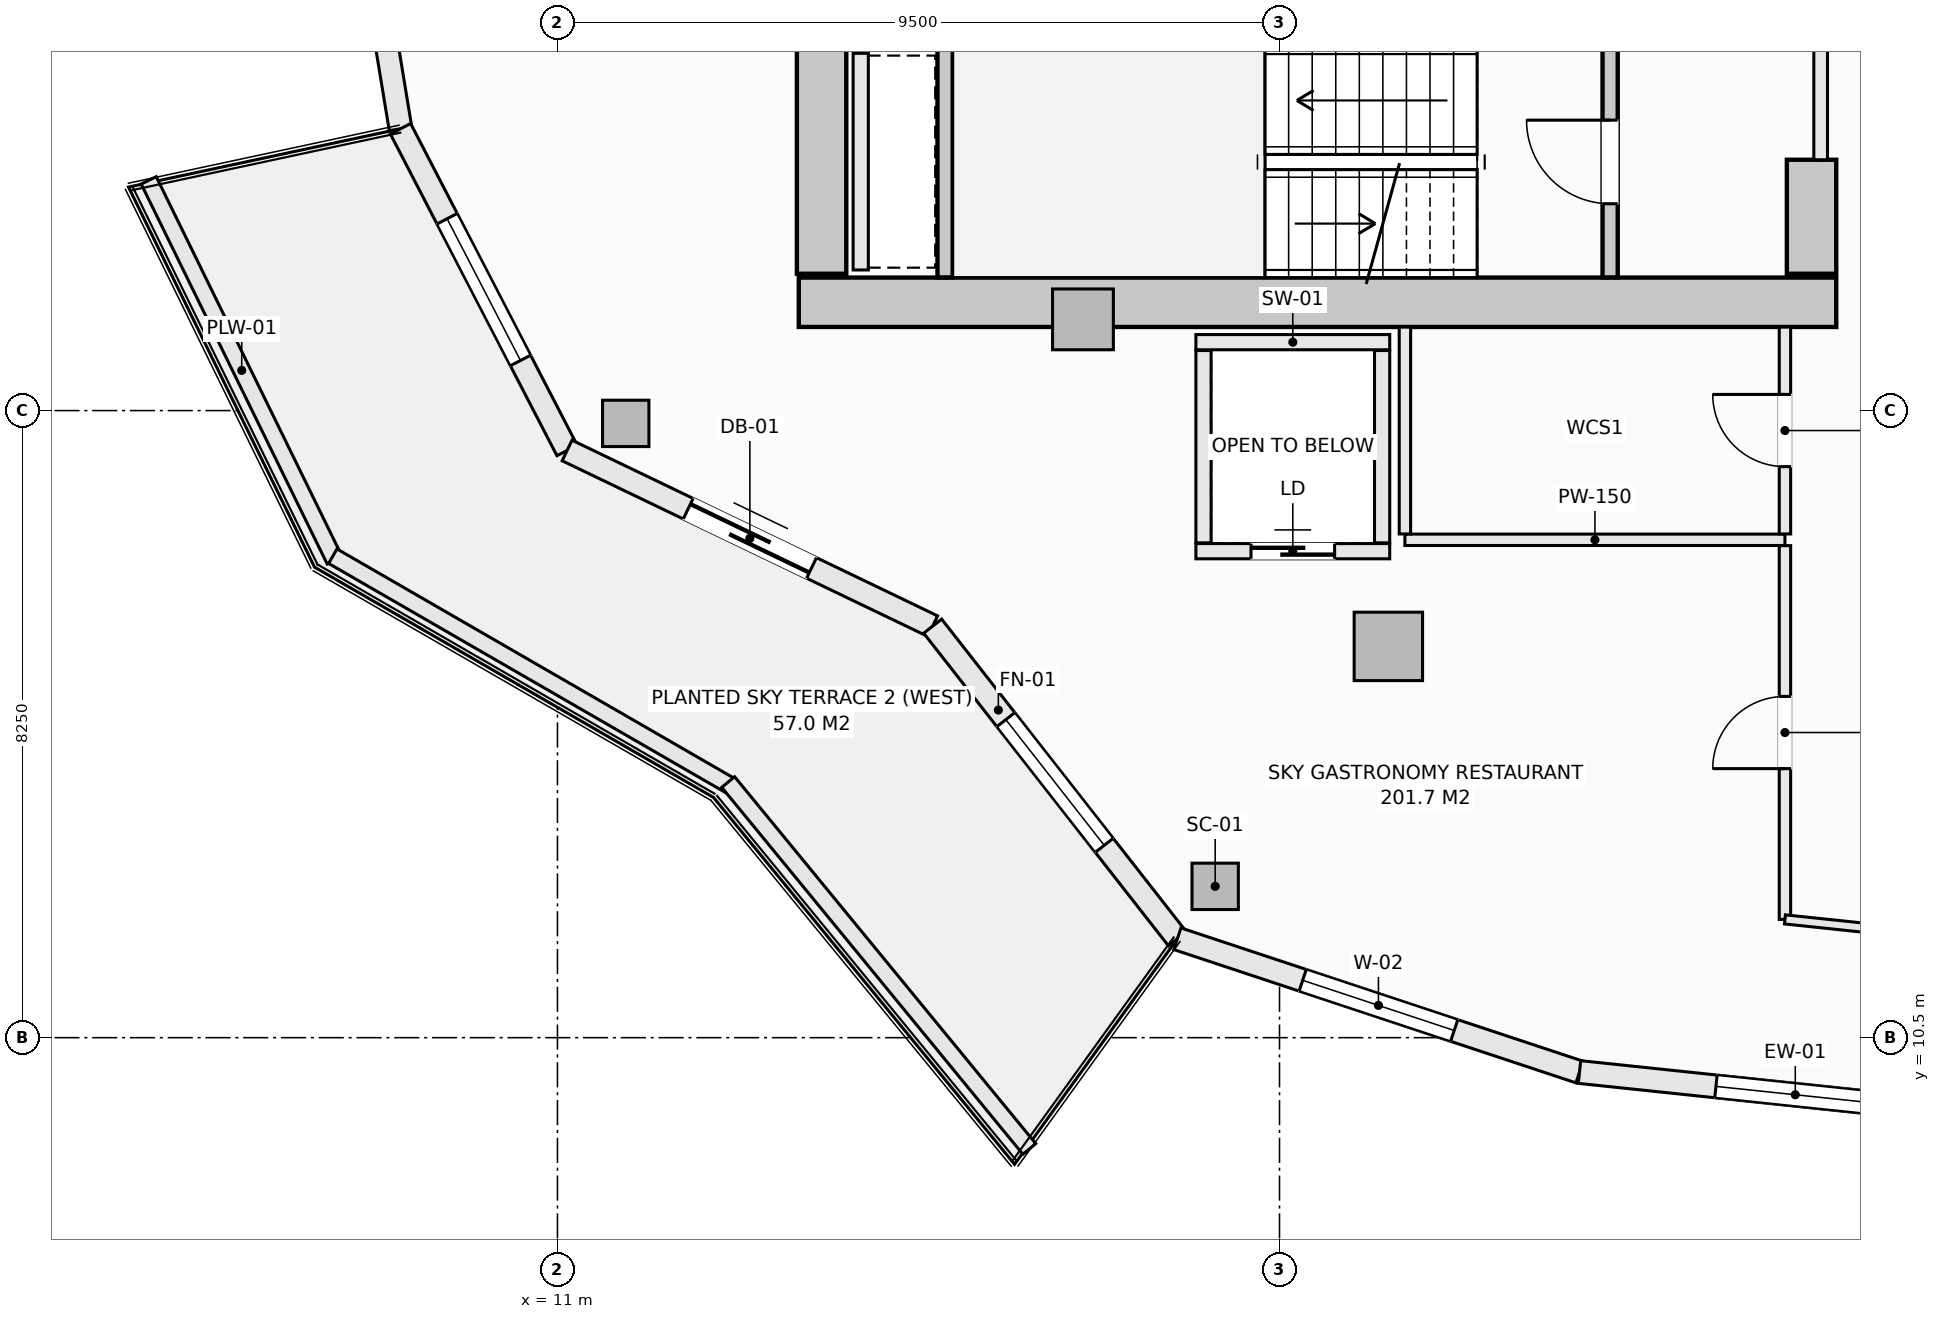
"""IFC4 building model, lengths in metres.
Left out: names, types, materials, properties, quantities, classifications, styles, units other than length and angle.
Written with IfcOpenShell. Run it as: python <this file> out.ifc"""

import sys

from ifc_helpers import new_model, si_unit, direction, frame, frame_2d, origin, origin_2d, place, context, subcontext, project, spatial, rectangle, hollow_rectangle, extrude, element, fill, save


model = new_model("IFC4")
c1 = context("Model", 3, precision=1e-05, world=origin(), true_north=direction((0.0, 1.0)))
c2 = subcontext(c1, "Body", "Model", "MODEL_VIEW")
j1 = project(units=[si_unit("LENGTHUNIT", "METRE"), si_unit("PLANEANGLEUNIT", "RADIAN")], contexts=[c1])
p1 = place(None, origin())
s1 = spatial("IfcSite", under=j1, at=p1, CompositionType="ELEMENT")
p2 = place(p1, origin())
s2 = spatial("IfcBuilding", under=s1, at=p2, CompositionType="ELEMENT")
p3 = place(p2, frame((0.0, 0.0, 183.5)))
s3 = spatial("IfcBuildingStorey", under=s2, at=p3, CompositionType="ELEMENT", Elevation=183.5)
p4 = place(p3, frame((14.175, 20.175, -0.27), z_axis=(0.0, 0.0, 1.0), x_axis=(1.0, 0.0, 0.0)))
e1 = element("IfcWall", 1, at=p4, inside=s3, PredefinedType="SHEAR", context=c2, shape_type="SweptSolid", body=[
    extrude(rectangle(XDim=13.65, YDim=0.65, at=frame_2d((6.825, 0.0))), origin(), (0.0, 0.0, 1.0), 3.35),
])
p5 = place(p3, frame((14.475, 20.55, -0.27), z_axis=(0.0, 0.0, 1.0), x_axis=(0.0, 1.0, 0.0)))
e2 = element("IfcWall", 2, at=p5, inside=s3, PredefinedType="SHEAR", context=c2, shape_type="SweptSolid", body=[
    extrude(rectangle(XDim=12.9, YDim=0.65, at=frame_2d((6.45, 0.0))), origin(), (0.0, 0.0, 1.0), 3.35),
])
p6 = place(p3, frame((27.5, 20.55, -0.27), z_axis=(0.0, 0.0, 1.0), x_axis=(0.0, 1.0, 0.0)))
e3 = element("IfcWall", 3, at=p6, inside=s3, PredefinedType="SHEAR", context=c2, shape_type="SweptSolid", body=[
    extrude(rectangle(XDim=1.5, YDim=0.65, at=frame_2d((0.75, 0.0))), origin(), (0.0, 0.0, 1.0), 3.35),
])
for number, where, z_axis, x_axis in (
    (4, (11.898, 18.581, -0.27), (0.0, 0.0, 1.0), (1.0, 0.0, 0.0)),
    (5, (19.654, 12.49, -0.27), (0.0, 0.0, 1.0), (1.0, 0.0, 0.0)),
):
    element("IfcColumn", number, at=place(p3, frame(where, z_axis=z_axis, x_axis=x_axis)), inside=s3, PredefinedType="COLUMN", context=c2, shape_type="SweptSolid", body=[
        extrude(hollow_rectangle(XDim=0.61, YDim=0.61, WallThickness=0.025, at=origin_2d()), origin(), (0.0, 0.0, 1.0), 3.35),
    ])
p7 = place(p3, frame((21.932, 15.648, -0.27), z_axis=(0.0, 0.0, 1.0), x_axis=(1.0, 0.0, 0.0)))
e6 = element("IfcColumn", 6, at=p7, inside=s3, PredefinedType="COLUMN", context=c2, shape_type="SweptSolid", body=[
    extrude(rectangle(XDim=0.9, YDim=0.9, at=origin_2d()), origin(), (0.0, 0.0, 1.0), 3.35),
])
p8 = place(p3, frame((17.914, 19.95, -0.27), z_axis=(0.0, 0.0, 1.0), x_axis=(1.0, 0.0, 0.0)))
e7 = element("IfcColumn", 7, at=p8, inside=s3, PredefinedType="PILASTER", context=c2, shape_type="SweptSolid", body=[
    extrude(rectangle(XDim=0.8, YDim=0.8, at=origin_2d()), origin(), (0.0, 0.0, 1.0), 3.35),
])
p9 = place(p3, frame((8.188, 27.0, 0.0), z_axis=(0.0, 0.0, 1.0), x_axis=(0.162394765401, -0.986725868806, 0.0)))
e8 = element("IfcWall", 8, at=p9, inside=s3, PredefinedType="SOLIDWALL", context=c2, shape_type="SweptSolid", body=[
    extrude(rectangle(XDim=4.603, YDim=0.3, at=frame_2d((2.302, 0.0))), origin(), (0.0, 0.0, 1.0), 2.603),
])
p10 = place(p9, frame((1.252, 0.0, 0.74)))
e9 = element("IfcOpeningElement", 9, at=p10, cuts=e8, PredefinedType="OPENING", context=c2, shape_type="SweptSolid", body=[
    extrude(rectangle(XDim=2.1, YDim=1.7, at=frame_2d((1.05, 0.85))), frame((0.0, 0.16, 0.0), z_axis=(0.0, -1.0, 0.0), x_axis=(1.0, 0.0, 0.0)), (0.0, 0.0, 1.0), 0.32),
])
p11 = place(p3, frame((8.935, 22.458, 0.0), z_axis=(0.0, 0.0, 1.0), x_axis=(0.459810251451, -0.888017191647, 0.0)))
e10 = element("IfcWall", 10, at=p11, inside=s3, PredefinedType="SOLIDWALL", context=c2, shape_type="SweptSolid", body=[
    extrude(rectangle(XDim=4.766, YDim=0.3, at=frame_2d((2.383, 0.0))), origin(), (0.0, 0.0, 1.0), 2.603),
])
p12 = place(p11, frame((1.333, 0.0, 0.74)))
e11 = element("IfcOpeningElement", 11, at=p12, cuts=e10, PredefinedType="OPENING", context=c2, shape_type="SweptSolid", body=[
    extrude(rectangle(XDim=2.1, YDim=1.7, at=frame_2d((1.05, 0.85))), frame((0.0, 0.16, 0.0), z_axis=(0.0, -1.0, 0.0), x_axis=(1.0, 0.0, 0.0)), (0.0, 0.0, 1.0), 0.32),
])
p13 = place(p3, frame((11.127, 18.225, 0.0), z_axis=(0.0, 0.0, 1.0), x_axis=(0.901353070301, -0.433085029363, 0.0)))
e12 = element("IfcWall", 12, at=p13, inside=s3, PredefinedType="SOLIDWALL", context=c2, shape_type="SweptSolid", body=[
    extrude(rectangle(XDim=5.336, YDim=0.3, at=frame_2d((2.668, 0.0))), origin(), (0.0, 0.0, 1.0), 2.603),
])
p14 = place(p13, frame((1.768, 0.0, 0.0)))
e13 = element("IfcOpeningElement", 13, at=p14, cuts=e12, PredefinedType="OPENING", context=c2, shape_type="SweptSolid", body=[
    extrude(rectangle(XDim=1.8, YDim=2.25, at=frame_2d((0.9, 1.125))), frame((0.0, 0.16, 0.0), z_axis=(0.0, -1.0, 0.0), x_axis=(1.0, 0.0, 0.0)), (0.0, 0.0, 1.0), 0.32),
])
p15 = place(p3, frame((15.937, 15.914, 0.0), z_axis=(0.0, 0.0, 1.0), x_axis=(0.616429245738, -0.787410302828, 0.0)))
e14 = element("IfcWall", 14, at=p15, inside=s3, PredefinedType="SOLIDWALL", context=c2, shape_type="SweptSolid", body=[
    extrude(rectangle(XDim=5.223, YDim=0.3, at=frame_2d((2.612, 0.0))), origin(), (0.0, 0.0, 1.0), 2.603),
])
p16 = place(p15, frame((1.562, 0.0, 0.74)))
e15 = element("IfcOpeningElement", 15, at=p16, cuts=e14, PredefinedType="OPENING", context=c2, shape_type="SweptSolid", body=[
    extrude(rectangle(XDim=2.1, YDim=1.7, at=frame_2d((1.05, 0.85))), frame((0.0, 0.16, 0.0), z_axis=(0.0, -1.0, 0.0), x_axis=(1.0, 0.0, 0.0)), (0.0, 0.0, 1.0), 0.32),
])
p17 = place(p3, frame((19.156, 11.801, 0.0), z_axis=(0.0, 0.0, 1.0), x_axis=(0.949246811547, -0.314532177636, 0.0)))
e16 = element("IfcWall", 16, at=p17, inside=s3, PredefinedType="SOLIDWALL", context=c2, shape_type="SweptSolid", body=[
    extrude(rectangle(XDim=5.574, YDim=0.3, at=frame_2d((2.787, 0.0))), origin(), (0.0, 0.0, 1.0), 2.603),
])
p18 = place(p17, frame((1.737, 0.0, 0.74)))
e17 = element("IfcOpeningElement", 17, at=p18, cuts=e16, PredefinedType="OPENING", context=c2, shape_type="SweptSolid", body=[
    extrude(rectangle(XDim=2.1, YDim=1.7, at=frame_2d((1.05, 0.85))), frame((0.0, 0.16, 0.0), z_axis=(0.0, -1.0, 0.0), x_axis=(1.0, 0.0, 0.0)), (0.0, 0.0, 1.0), 0.32),
])
p19 = place(p3, frame((24.447, 10.048, 0.0), z_axis=(0.0, 0.0, 1.0), x_axis=(0.994496545245, -0.104769372887, 0.0)))
e18 = element("IfcWall", 18, at=p19, inside=s3, PredefinedType="SOLIDWALL", context=c2, shape_type="SweptSolid", body=[
    extrude(rectangle(XDim=5.709, YDim=0.3, at=frame_2d((2.854, 0.0))), origin(), (0.0, 0.0, 1.0), 2.603),
])
p20 = place(p19, frame((1.805, 0.0, 0.74)))
e19 = element("IfcOpeningElement", 19, at=p20, cuts=e18, PredefinedType="OPENING", context=c2, shape_type="SweptSolid", body=[
    extrude(rectangle(XDim=2.1, YDim=1.7, at=frame_2d((1.05, 0.85))), frame((0.0, 0.16, 0.0), z_axis=(0.0, -1.0, 0.0), x_axis=(1.0, 0.0, 0.0)), (0.0, 0.0, 1.0), 0.32),
])
p21 = place(p3, frame((5.622, 21.779, 0.0), z_axis=(0.0, 0.0, 1.0), x_axis=(0.439637174641, -0.898175458735, 0.0)))
e20 = element("IfcWall", 20, at=p21, inside=s3, PredefinedType="PARAPET", context=c2, shape_type="SweptSolid", body=[
    extrude(rectangle(XDim=5.567, YDim=0.22, at=frame_2d((2.784, 0.0))), origin(), (0.0, 0.0, 1.0), 0.52),
])
p22 = place(p3, frame((8.044, 16.834, 0.0), z_axis=(0.0, 0.0, 1.0), x_axis=(0.866058128659, -0.499943314571, 0.0)))
e21 = element("IfcWall", 21, at=p22, inside=s3, PredefinedType="PARAPET", context=c2, shape_type="SweptSolid", body=[
    extrude(rectangle(XDim=6.06, YDim=0.22, at=frame_2d((3.03, 0.0))), origin(), (0.0, 0.0, 1.0), 0.52),
])
p23 = place(p3, frame((13.246, 13.863, 0.0), z_axis=(0.0, 0.0, 1.0), x_axis=(0.634429234628, -0.77298094818, 0.0)))
e22 = element("IfcWall", 22, at=p23, inside=s3, PredefinedType="PARAPET", context=c2, shape_type="SweptSolid", body=[
    extrude(rectangle(XDim=6.245, YDim=0.22, at=frame_2d((3.123, 0.0))), origin(), (0.0, 0.0, 1.0), 0.52),
])
p24 = place(p3, frame((24.85, 20.502, -0.27), z_axis=(0.0, 0.0, 1.0), x_axis=(0.0, 1.0, 0.0)))
e23 = element("IfcWall", 23, at=p24, inside=s3, PredefinedType="SHEAR", context=c2, shape_type="SweptSolid", body=[
    extrude(rectangle(XDim=3.038, YDim=0.2, at=frame_2d((1.519, 0.0))), origin(), (0.0, 0.0, 1.0), 3.35),
])
p25 = place(p24, frame((0.969, 0.0, 0.27)))
e24 = element("IfcOpeningElement", 24, at=p25, cuts=e23, PredefinedType="OPENING", context=c2, shape_type="SweptSolid", body=[
    extrude(rectangle(XDim=1.1, YDim=2.15, at=frame_2d((0.55, 1.075))), frame((0.0, 0.11, 0.0), z_axis=(0.0, -1.0, 0.0), x_axis=(1.0, 0.0, 0.0)), (0.0, 0.0, 1.0), 0.22),
])
p26 = place(p3, frame((16.1, 20.502, -0.27), z_axis=(0.0, 0.0, 1.0), x_axis=(0.0, 1.0, 0.0)))
e25 = element("IfcWall", 25, at=p26, inside=s3, PredefinedType="SHEAR", context=c2, shape_type="SweptSolid", body=[
    extrude(rectangle(XDim=3.036, YDim=0.2, at=frame_2d((1.518, 0.0))), origin(), (0.0, 0.0, 1.0), 3.35),
])
p27 = place(p3, frame((19.4, 19.65, 0.0), z_axis=(0.0, 0.0, 1.0), x_axis=(1.0, 0.0, 0.0)))
e26 = element("IfcWall", 26, at=p27, inside=s3, PredefinedType="SOLIDWALL", context=c2, shape_type="SweptSolid", body=[
    extrude(rectangle(XDim=2.55, YDim=0.2, at=frame_2d((1.275, 0.0))), origin(), (0.0, 0.0, 1.0), 3.08),
])
p28 = place(p3, frame((19.4, 16.9, 0.0), z_axis=(0.0, 0.0, 1.0), x_axis=(1.0, 0.0, 0.0)))
e27 = element("IfcWall", 27, at=p28, inside=s3, PredefinedType="SOLIDWALL", context=c2, shape_type="SweptSolid", body=[
    extrude(rectangle(XDim=2.55, YDim=0.2, at=frame_2d((1.275, 0.0))), origin(), (0.0, 0.0, 1.0), 3.08),
])
p29 = place(p28, frame((0.725, 0.0, 0.0)))
e28 = element("IfcOpeningElement", 28, at=p29, cuts=e27, PredefinedType="OPENING", context=c2, shape_type="SweptSolid", body=[
    extrude(rectangle(XDim=1.1, YDim=2.2, at=frame_2d((0.55, 1.1))), frame((0.0, 0.11, 0.0), z_axis=(0.0, -1.0, 0.0), x_axis=(1.0, 0.0, 0.0)), (0.0, 0.0, 1.0), 0.22),
])
for number, where, z_axis, x_axis in (
    (29, (19.5, 17.01, 0.0), (0.0, 0.0, 1.0), (0.0, 1.0, 0.0)),
    (30, (21.85, 17.01, 0.0), (0.0, 0.0, 1.0), (0.0, 1.0, 0.0)),
):
    element("IfcWall", number, at=place(p3, frame(where, z_axis=z_axis, x_axis=x_axis)), inside=s3, PredefinedType="SOLIDWALL", context=c2, shape_type="SweptSolid", body=[
        extrude(rectangle(XDim=2.53, YDim=0.2, at=frame_2d((1.265, 0.0))), origin(), (0.0, 0.0, 1.0), 3.08),
    ])
p30 = place(p3, frame((14.99, 20.6, 0.0), z_axis=(0.0, 0.0, 1.0), x_axis=(0.0, 1.0, 0.0)))
e31 = element("IfcWall", 31, at=p30, inside=s3, PredefinedType="SOLIDWALL", context=c2, shape_type="SweptSolid", body=[
    extrude(rectangle(XDim=2.85, YDim=0.2, at=frame_2d((1.425, 0.0))), origin(), (0.0, 0.0, 1.0), 3.08),
])
p31 = place(p3, frame((27.62, 22.05, 0.0), z_axis=(0.0, 0.0, 1.0), x_axis=(0.0, 1.0, 0.0)))
e32 = element("IfcWall", 32, at=p31, inside=s3, PredefinedType="SOLIDWALL", context=c2, shape_type="SweptSolid", body=[
    extrude(rectangle(XDim=9.9, YDim=0.18, at=frame_2d((4.95, 0.0))), origin(), (0.0, 0.0, 1.0), 3.08),
])
p32 = place(p31, frame((4.475, 0.0, 0.0)))
e33 = element("IfcOpeningElement", 33, at=p32, cuts=e32, PredefinedType="OPENING", context=c2, shape_type="SweptSolid", body=[
    extrude(rectangle(XDim=0.95, YDim=2.1, at=frame_2d((0.475, 1.05))), frame((0.0, 0.1, 0.0), z_axis=(0.0, -1.0, 0.0), x_axis=(1.0, 0.0, 0.0)), (0.0, 0.0, 1.0), 0.2),
])
p33 = place(p31, frame((6.89, 0.0, 0.0)))
e34 = element("IfcOpeningElement", 34, at=p33, cuts=e32, PredefinedType="OPENING", context=c2, shape_type="SweptSolid", body=[
    extrude(rectangle(XDim=1.5, YDim=2.2, at=frame_2d((0.75, 1.1))), frame((0.0, 0.1, 0.0), z_axis=(0.0, -1.0, 0.0), x_axis=(1.0, 0.0, 0.0)), (0.0, 0.0, 1.0), 0.2),
])
p34 = place(p31, frame((1.51, 0.0, 0.0)))
e35 = element("IfcOpeningElement", 35, at=p34, cuts=e32, PredefinedType="OPENING", context=c2, shape_type="SweptSolid", body=[
    extrude(rectangle(XDim=1.5, YDim=2.2, at=frame_2d((0.75, 1.1))), frame((0.0, 0.1, 0.0), z_axis=(0.0, -1.0, 0.0), x_axis=(1.0, 0.0, 0.0)), (0.0, 0.0, 1.0), 0.2),
])
p35 = place(p3, frame((22.15, 17.05, 0.0), z_axis=(0.0, 0.0, 1.0), x_axis=(1.0, 0.0, 0.0)))
e36 = element("IfcWall", 36, at=p35, inside=s3, PredefinedType="PARTITIONING", context=c2, shape_type="SweptSolid", body=[
    extrude(rectangle(XDim=5.0, YDim=0.15, at=frame_2d((2.5, 0.0))), origin(), (0.0, 0.0, 1.0), 3.08),
])
p36 = place(p3, frame((22.15, 17.127, 0.0), z_axis=(0.0, 0.0, 1.0), x_axis=(0.0, 1.0, 0.0)))
e37 = element("IfcWall", 37, at=p36, inside=s3, PredefinedType="PARTITIONING", context=c2, shape_type="SweptSolid", body=[
    extrude(rectangle(XDim=2.721, YDim=0.15, at=frame_2d((1.36, 0.0))), origin(), (0.0, 0.0, 1.0), 3.08),
])
p37 = place(p3, frame((27.15, 12.056, 0.0), z_axis=(0.0, 0.0, 1.0), x_axis=(0.0, 1.0, 0.0)))
e38 = element("IfcWall", 38, at=p37, inside=s3, PredefinedType="PARTITIONING", context=c2, shape_type="SweptSolid", body=[
    extrude(rectangle(XDim=4.917, YDim=0.15, at=frame_2d((2.458, 0.0))), origin(), (0.0, 0.0, 1.0), 3.08),
])
p38 = place(p37, frame((1.983, 0.0, 0.0)))
e39 = element("IfcOpeningElement", 39, at=p38, cuts=e38, PredefinedType="OPENING", context=c2, shape_type="SweptSolid", body=[
    extrude(rectangle(XDim=0.95, YDim=2.1, at=frame_2d((0.475, 1.05))), frame((0.0, 0.085, 0.0), z_axis=(0.0, -1.0, 0.0), x_axis=(1.0, 0.0, 0.0)), (0.0, 0.0, 1.0), 0.17),
])
p39 = place(p3, frame((27.15, 17.127, 0.0), z_axis=(0.0, 0.0, 1.0), x_axis=(0.0, 1.0, 0.0)))
e40 = element("IfcWall", 40, at=p39, inside=s3, PredefinedType="PARTITIONING", context=c2, shape_type="SweptSolid", body=[
    extrude(rectangle(XDim=2.721, YDim=0.15, at=frame_2d((1.36, 0.0))), origin(), (0.0, 0.0, 1.0), 3.08),
])
p40 = place(p39, frame((0.885, 0.0, 0.0)))
e41 = element("IfcOpeningElement", 41, at=p40, cuts=e40, PredefinedType="OPENING", context=c2, shape_type="SweptSolid", body=[
    extrude(rectangle(XDim=0.95, YDim=2.1, at=frame_2d((0.475, 1.05))), frame((0.0, 0.085, 0.0), z_axis=(0.0, -1.0, 0.0), x_axis=(1.0, 0.0, 0.0)), (0.0, 0.0, 1.0), 0.17),
])
p41 = place(p3, frame((27.15, 12.056, 0.0), z_axis=(0.0, 0.0, 1.0), x_axis=(0.994501330468, -0.104723940422, 0.0)))
e42 = element("IfcWall", 42, at=p41, inside=s3, PredefinedType="PARTITIONING", context=c2, shape_type="SweptSolid", body=[
    extrude(rectangle(XDim=2.921, YDim=0.12, at=frame_2d((1.46, 0.0))), origin(), (0.0, 0.0, 1.0), 3.08),
])
p42 = place(p12, origin())
e43 = element("IfcWindow", 43, at=p42, inside=s3, PartitioningType="SINGLE_PANEL", PredefinedType="WINDOW", context=c2, shape_type="SweptSolid", body=[
    extrude(rectangle(XDim=2.1, YDim=1.7, at=frame_2d((1.05, 0.85))), frame((0.0, 0.03, 0.0), z_axis=(0.0, -1.0, 0.0), x_axis=(1.0, 0.0, 0.0)), (0.0, 0.0, 1.0), 0.06),
])
fill(e11, e43)
p43 = place(p14, frame((1.8, 0.0, 0.0), z_axis=(0.0, 0.0, 1.0), x_axis=(-1.0, 0.0, 0.0)))
e44 = element("IfcDoor", 44, at=p43, inside=s3, OperationType="SLIDING_TO_LEFT", PredefinedType="DOOR", context=c2, shape_type="SweptSolid", body=[
    extrude(rectangle(XDim=1.8, YDim=2.25, at=frame_2d((0.9, 1.125))), frame((0.0, 0.025, 0.0), z_axis=(0.0, -1.0, 0.0), x_axis=(1.0, 0.0, 0.0)), (0.0, 0.0, 1.0), 0.05),
])
fill(e13, e44)
p44 = place(p16, origin())
e45 = element("IfcWindow", 45, at=p44, inside=s3, PartitioningType="SINGLE_PANEL", PredefinedType="WINDOW", context=c2, shape_type="SweptSolid", body=[
    extrude(rectangle(XDim=2.1, YDim=1.7, at=frame_2d((1.05, 0.85))), frame((0.0, 0.03, 0.0), z_axis=(0.0, -1.0, 0.0), x_axis=(1.0, 0.0, 0.0)), (0.0, 0.0, 1.0), 0.06),
])
fill(e15, e45)
p45 = place(p18, origin())
e46 = element("IfcWindow", 46, at=p45, inside=s3, PartitioningType="SINGLE_PANEL", PredefinedType="WINDOW", context=c2, shape_type="SweptSolid", body=[
    extrude(rectangle(XDim=2.1, YDim=1.7, at=frame_2d((1.05, 0.85))), frame((0.0, 0.03, 0.0), z_axis=(0.0, -1.0, 0.0), x_axis=(1.0, 0.0, 0.0)), (0.0, 0.0, 1.0), 0.06),
])
fill(e17, e46)
p46 = place(p20, origin())
e47 = element("IfcWindow", 47, at=p46, inside=s3, PartitioningType="SINGLE_PANEL", PredefinedType="WINDOW", context=c2, shape_type="SweptSolid", body=[
    extrude(rectangle(XDim=2.1, YDim=1.7, at=frame_2d((1.05, 0.85))), frame((0.0, 0.03, 0.0), z_axis=(0.0, -1.0, 0.0), x_axis=(1.0, 0.0, 0.0)), (0.0, 0.0, 1.0), 0.06),
])
fill(e19, e47)
p47 = place(p25, origin())
e48 = element("IfcDoor", 48, at=p47, inside=s3, OperationType="SINGLE_SWING_RIGHT", PredefinedType="DOOR", context=c2, shape_type="SweptSolid", body=[
    extrude(rectangle(XDim=1.1, YDim=2.15, at=frame_2d((0.55, 1.075))), frame((0.0, 0.025, 0.0), z_axis=(0.0, -1.0, 0.0), x_axis=(1.0, 0.0, 0.0)), (0.0, 0.0, 1.0), 0.05),
])
fill(e24, e48)
p48 = place(p29, origin())
e49 = element("IfcDoor", 49, at=p48, inside=s3, OperationType="SLIDING_TO_LEFT", PredefinedType="DOOR", context=c2, shape_type="SweptSolid", body=[
    extrude(rectangle(XDim=1.1, YDim=2.2, at=frame_2d((0.55, 1.1))), frame((0.0, 0.025, 0.0), z_axis=(0.0, -1.0, 0.0), x_axis=(1.0, 0.0, 0.0)), (0.0, 0.0, 1.0), 0.05),
])
fill(e28, e49)
p49 = place(p40, origin())
e50 = element("IfcDoor", 50, at=p49, inside=s3, OperationType="SINGLE_SWING_RIGHT", PredefinedType="DOOR", context=c2, shape_type="SweptSolid", body=[
    extrude(rectangle(XDim=0.95, YDim=2.1, at=frame_2d((0.475, 1.05))), frame((0.0, 0.025, 0.0), z_axis=(0.0, -1.0, 0.0), x_axis=(1.0, 0.0, 0.0)), (0.0, 0.0, 1.0), 0.05),
])
fill(e41, e50)
p50 = place(p38, origin())
e51 = element("IfcDoor", 51, at=p50, inside=s3, OperationType="SINGLE_SWING_LEFT", PredefinedType="DOOR", context=c2, shape_type="SweptSolid", body=[
    extrude(rectangle(XDim=0.95, YDim=2.1, at=frame_2d((0.475, 1.05))), frame((0.0, 0.025, 0.0), z_axis=(0.0, -1.0, 0.0), x_axis=(1.0, 0.0, 0.0)), (0.0, 0.0, 1.0), 0.05),
])
fill(e39, e51)
save(model, sys.argv[1])
